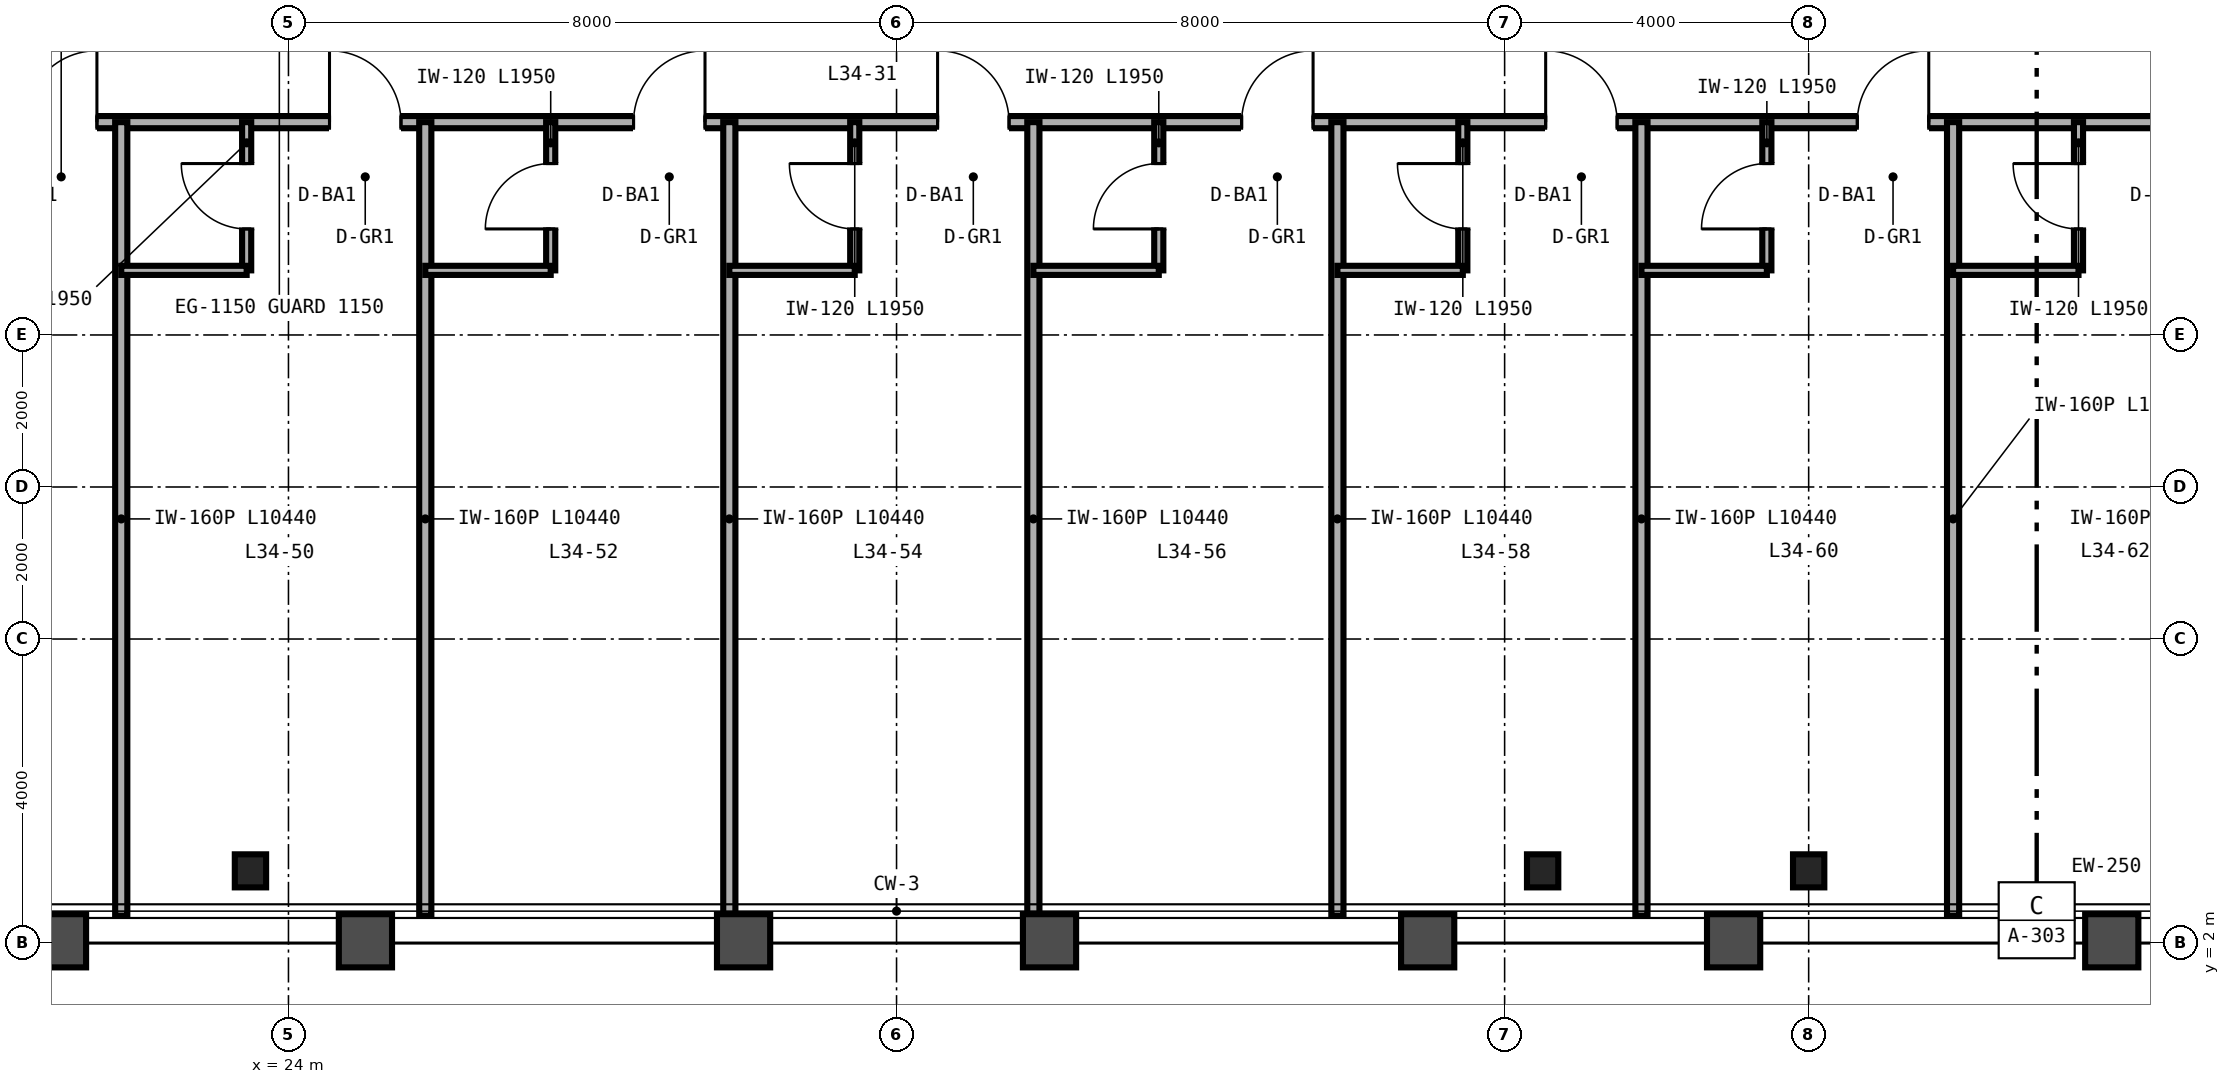
"""IFC4 building model, lengths in metres.
Left out: names, types, materials, properties, quantities, classifications, styles, units other than length and angle.
Written with IfcOpenShell. Run it as: python <this file> out.ifc"""

import sys

from ifc_helpers import new_model, si_unit, direction, frame, frame_2d, origin, origin_2d, place, context, subcontext, project, spatial, rectangle, i_section, extrude, source, transform, mapped, element, fill, save


model = new_model("IFC4")
c1 = context("Model", 3, precision=1e-05, world=origin(), true_north=direction((0.0, 1.0)))
c2 = subcontext(c1, "Body", "Model", "MODEL_VIEW")
j1 = project(units=[si_unit("LENGTHUNIT", "METRE"), si_unit("PLANEANGLEUNIT", "RADIAN")], contexts=[c1])
p1 = place(None, origin())
s1 = spatial("IfcSite", under=j1, at=p1, CompositionType="ELEMENT")
p2 = place(p1, origin())
s2 = spatial("IfcBuilding", under=s1, at=p2, CompositionType="ELEMENT")
p3 = place(p2, frame((0.0, 0.0, 136.8)))
s3 = spatial("IfcBuildingStorey", under=s2, at=p3, CompositionType="ELEMENT", Elevation=136.8)
m1 = source(origin(), c2, "Body", "SweptSolid", [
    extrude(i_section(OverallWidth=0.412, OverallDepth=0.435, WebThickness=0.036, FlangeThickness=0.057, FilletRadius=0.025, at=origin_2d()), origin(), (0.0, 0.0, 1.0), 3.36),
])
for number, where, z_axis, x_axis in (
    (1, (23.5, 2.95, 0.0), (0.0, 0.0, 1.0), (1.0, 0.0, 0.0)),
    (2, (40.5, 2.95, 0.0), (0.0, 0.0, 1.0), (1.0, 0.0, 0.0)),
    (3, (44.0, 2.95, 0.0), (0.0, 0.0, 1.0), (1.0, 0.0, 0.0)),
):
    element("IfcColumn", number, at=place(p3, frame(where, z_axis=z_axis, x_axis=x_axis)), inside=s3, PredefinedType="COLUMN", context=c2, shape_type="MappedRepresentation", body=[
        mapped(m1, transform((0.0, 0.0, 0.0), scale=1.0)),
    ])
p4 = place(p3, frame((14.0, 12.8, 0.0), z_axis=(0.0, 0.0, 1.0), x_axis=(1.0, 0.0, 0.0)))
e4 = element("IfcWall", 4, at=p4, inside=s3, PredefinedType="PARTITIONING", context=c2, shape_type="SweptSolid", body=[
    extrude(rectangle(XDim=36.0, YDim=0.16, at=frame_2d((18.0, 0.0))), origin(), (0.0, 0.0, 1.0), 2.581),
])
p5 = place(p4, frame((2.64, 0.0, 0.0)))
e5 = element("IfcOpeningElement", 5, at=p5, cuts=e4, PredefinedType="OPENING", context=c2, shape_type="SweptSolid", body=[
    extrude(rectangle(XDim=0.94, YDim=2.15, at=frame_2d((0.47, 1.075))), frame((0.0, 0.09, 0.0), z_axis=(0.0, -1.0, 0.0), x_axis=(1.0, 0.0, 0.0)), (0.0, 0.0, 1.0), 0.18),
])
p6 = place(p4, frame((6.54, 0.0, 0.0)))
e6 = element("IfcOpeningElement", 6, at=p6, cuts=e4, PredefinedType="OPENING", context=c2, shape_type="SweptSolid", body=[
    extrude(rectangle(XDim=0.94, YDim=2.15, at=frame_2d((0.47, 1.075))), frame((0.0, 0.09, 0.0), z_axis=(0.0, -1.0, 0.0), x_axis=(1.0, 0.0, 0.0)), (0.0, 0.0, 1.0), 0.18),
])
p7 = place(p4, frame((10.54, 0.0, 0.0)))
e7 = element("IfcOpeningElement", 7, at=p7, cuts=e4, PredefinedType="OPENING", context=c2, shape_type="SweptSolid", body=[
    extrude(rectangle(XDim=0.94, YDim=2.15, at=frame_2d((0.47, 1.075))), frame((0.0, 0.09, 0.0), z_axis=(0.0, -1.0, 0.0), x_axis=(1.0, 0.0, 0.0)), (0.0, 0.0, 1.0), 0.18),
])
p8 = place(p4, frame((14.54, 0.0, 0.0)))
e8 = element("IfcOpeningElement", 8, at=p8, cuts=e4, PredefinedType="OPENING", context=c2, shape_type="SweptSolid", body=[
    extrude(rectangle(XDim=0.94, YDim=2.15, at=frame_2d((0.47, 1.075))), frame((0.0, 0.09, 0.0), z_axis=(0.0, -1.0, 0.0), x_axis=(1.0, 0.0, 0.0)), (0.0, 0.0, 1.0), 0.18),
])
p9 = place(p4, frame((18.54, 0.0, 0.0)))
e9 = element("IfcOpeningElement", 9, at=p9, cuts=e4, PredefinedType="OPENING", context=c2, shape_type="SweptSolid", body=[
    extrude(rectangle(XDim=0.94, YDim=2.15, at=frame_2d((0.47, 1.075))), frame((0.0, 0.09, 0.0), z_axis=(0.0, -1.0, 0.0), x_axis=(1.0, 0.0, 0.0)), (0.0, 0.0, 1.0), 0.18),
])
p10 = place(p4, frame((22.54, 0.0, 0.0)))
e10 = element("IfcOpeningElement", 10, at=p10, cuts=e4, PredefinedType="OPENING", context=c2, shape_type="SweptSolid", body=[
    extrude(rectangle(XDim=0.94, YDim=2.15, at=frame_2d((0.47, 1.075))), frame((0.0, 0.09, 0.0), z_axis=(0.0, -1.0, 0.0), x_axis=(1.0, 0.0, 0.0)), (0.0, 0.0, 1.0), 0.18),
])
p11 = place(p4, frame((26.54, 0.0, 0.0)))
e11 = element("IfcOpeningElement", 11, at=p11, cuts=e4, PredefinedType="OPENING", context=c2, shape_type="SweptSolid", body=[
    extrude(rectangle(XDim=0.94, YDim=2.15, at=frame_2d((0.47, 1.075))), frame((0.0, 0.09, 0.0), z_axis=(0.0, -1.0, 0.0), x_axis=(1.0, 0.0, 0.0)), (0.0, 0.0, 1.0), 0.18),
])
p12 = place(p4, frame((30.64, 0.0, 0.0)))
e12 = element("IfcOpeningElement", 12, at=p12, cuts=e4, PredefinedType="OPENING", context=c2, shape_type="SweptSolid", body=[
    extrude(rectangle(XDim=0.94, YDim=2.15, at=frame_2d((0.47, 1.075))), frame((0.0, 0.09, 0.0), z_axis=(0.0, -1.0, 0.0), x_axis=(1.0, 0.0, 0.0)), (0.0, 0.0, 1.0), 0.18),
])
p13 = place(p4, frame((34.74, 0.0, 0.0)))
e13 = element("IfcOpeningElement", 13, at=p13, cuts=e4, PredefinedType="OPENING", context=c2, shape_type="SweptSolid", body=[
    extrude(rectangle(XDim=0.94, YDim=2.15, at=frame_2d((0.47, 1.075))), frame((0.0, 0.09, 0.0), z_axis=(0.0, -1.0, 0.0), x_axis=(1.0, 0.0, 0.0)), (0.0, 0.0, 1.0), 0.18),
])
p14 = place(p3, frame((21.8, 2.36, 0.0), z_axis=(0.0, 0.0, 1.0), x_axis=(0.0, 1.0, 0.0)))
e14 = element("IfcWall", 14, at=p14, inside=s3, PredefinedType="PARTITIONING", context=c2, shape_type="SweptSolid", body=[
    extrude(rectangle(XDim=10.44, YDim=0.16, at=frame_2d((5.22, 0.0))), origin(), (0.0, 0.0, 1.0), 2.823),
])
p15 = place(p3, frame((25.8, 2.36, 0.0), z_axis=(0.0, 0.0, 1.0), x_axis=(0.0, 1.0, 0.0)))
e15 = element("IfcWall", 15, at=p15, inside=s3, PredefinedType="PARTITIONING", context=c2, shape_type="SweptSolid", body=[
    extrude(rectangle(XDim=10.44, YDim=0.16, at=frame_2d((5.22, 0.0))), origin(), (0.0, 0.0, 1.0), 2.433),
])
p16 = place(p3, frame((23.45, 10.85, 0.0), z_axis=(0.0, 0.0, 1.0), x_axis=(0.0, 1.0, 0.0)))
e16 = element("IfcWall", 16, at=p16, inside=s3, PredefinedType="PARTITIONING", context=c2, shape_type="SweptSolid", body=[
    extrude(rectangle(XDim=1.95, YDim=0.12, at=frame_2d((0.975, 0.0))), origin(), (0.0, 0.0, 1.0), 2.581),
])
p17 = place(p16, frame((0.545, 0.0, 0.0)))
e17 = element("IfcOpeningElement", 17, at=p17, cuts=e16, PredefinedType="OPENING", context=c2, shape_type="SweptSolid", body=[
    extrude(rectangle(XDim=0.86, YDim=2.1, at=frame_2d((0.43, 1.05))), frame((0.0, 0.07, 0.0), z_axis=(0.0, -1.0, 0.0), x_axis=(1.0, 0.0, 0.0)), (0.0, 0.0, 1.0), 0.14),
])
p18 = place(p3, frame((21.8, 10.85, 0.0), z_axis=(0.0, 0.0, 1.0), x_axis=(1.0, 0.0, 0.0)))
e18 = element("IfcWall", 18, at=p18, inside=s3, PredefinedType="PARTITIONING", context=c2, shape_type="SweptSolid", body=[
    extrude(rectangle(XDim=1.65, YDim=0.12, at=frame_2d((0.825, 0.0))), origin(), (0.0, 0.0, 1.0), 2.581),
])
p19 = place(p3, frame((29.8, 2.36, 0.0), z_axis=(0.0, 0.0, 1.0), x_axis=(0.0, 1.0, 0.0)))
e19 = element("IfcWall", 19, at=p19, inside=s3, PredefinedType="PARTITIONING", context=c2, shape_type="SweptSolid", body=[
    extrude(rectangle(XDim=10.44, YDim=0.16, at=frame_2d((5.22, 0.0))), origin(), (0.0, 0.0, 1.0), 2.433),
])
p20 = place(p3, frame((27.45, 10.85, 0.0), z_axis=(0.0, 0.0, 1.0), x_axis=(0.0, 1.0, 0.0)))
e20 = element("IfcWall", 20, at=p20, inside=s3, PredefinedType="PARTITIONING", context=c2, shape_type="SweptSolid", body=[
    extrude(rectangle(XDim=1.95, YDim=0.12, at=frame_2d((0.975, 0.0))), origin(), (0.0, 0.0, 1.0), 3.36),
])
p21 = place(p20, frame((0.545, 0.0, 0.0)))
e21 = element("IfcOpeningElement", 21, at=p21, cuts=e20, PredefinedType="OPENING", context=c2, shape_type="SweptSolid", body=[
    extrude(rectangle(XDim=0.86, YDim=2.1, at=frame_2d((0.43, 1.05))), frame((0.0, 0.07, 0.0), z_axis=(0.0, -1.0, 0.0), x_axis=(1.0, 0.0, 0.0)), (0.0, 0.0, 1.0), 0.14),
])
p22 = place(p3, frame((25.8, 10.85, 0.0), z_axis=(0.0, 0.0, 1.0), x_axis=(1.0, 0.0, 0.0)))
e22 = element("IfcWall", 22, at=p22, inside=s3, PredefinedType="PARTITIONING", context=c2, shape_type="SweptSolid", body=[
    extrude(rectangle(XDim=1.65, YDim=0.12, at=frame_2d((0.825, 0.0))), origin(), (0.0, 0.0, 1.0), 3.36),
])
p23 = place(p3, frame((33.8, 2.36, 0.0), z_axis=(0.0, 0.0, 1.0), x_axis=(0.0, 1.0, 0.0)))
e23 = element("IfcWall", 23, at=p23, inside=s3, PredefinedType="PARTITIONING", context=c2, shape_type="SweptSolid", body=[
    extrude(rectangle(XDim=10.44, YDim=0.16, at=frame_2d((5.22, 0.0))), origin(), (0.0, 0.0, 1.0), 2.433),
])
p24 = place(p3, frame((31.45, 10.85, 0.0), z_axis=(0.0, 0.0, 1.0), x_axis=(0.0, 1.0, 0.0)))
e24 = element("IfcWall", 24, at=p24, inside=s3, PredefinedType="PARTITIONING", context=c2, shape_type="SweptSolid", body=[
    extrude(rectangle(XDim=1.95, YDim=0.12, at=frame_2d((0.975, 0.0))), origin(), (0.0, 0.0, 1.0), 3.36),
])
p25 = place(p24, frame((0.545, 0.0, 0.0)))
e25 = element("IfcOpeningElement", 25, at=p25, cuts=e24, PredefinedType="OPENING", context=c2, shape_type="SweptSolid", body=[
    extrude(rectangle(XDim=0.86, YDim=2.1, at=frame_2d((0.43, 1.05))), frame((0.0, 0.07, 0.0), z_axis=(0.0, -1.0, 0.0), x_axis=(1.0, 0.0, 0.0)), (0.0, 0.0, 1.0), 0.14),
])
p26 = place(p3, frame((29.8, 10.85, 0.0), z_axis=(0.0, 0.0, 1.0), x_axis=(1.0, 0.0, 0.0)))
e26 = element("IfcWall", 26, at=p26, inside=s3, PredefinedType="PARTITIONING", context=c2, shape_type="SweptSolid", body=[
    extrude(rectangle(XDim=1.65, YDim=0.12, at=frame_2d((0.825, 0.0))), origin(), (0.0, 0.0, 1.0), 3.36),
])
p27 = place(p3, frame((37.8, 2.36, 0.0), z_axis=(0.0, 0.0, 1.0), x_axis=(0.0, 1.0, 0.0)))
e27 = element("IfcWall", 27, at=p27, inside=s3, PredefinedType="PARTITIONING", context=c2, shape_type="SweptSolid", body=[
    extrude(rectangle(XDim=10.44, YDim=0.16, at=frame_2d((5.22, 0.0))), origin(), (0.0, 0.0, 1.0), 2.433),
])
p28 = place(p3, frame((35.45, 10.85, 0.0), z_axis=(0.0, 0.0, 1.0), x_axis=(0.0, 1.0, 0.0)))
e28 = element("IfcWall", 28, at=p28, inside=s3, PredefinedType="PARTITIONING", context=c2, shape_type="SweptSolid", body=[
    extrude(rectangle(XDim=1.95, YDim=0.12, at=frame_2d((0.975, 0.0))), origin(), (0.0, 0.0, 1.0), 3.36),
])
p29 = place(p28, frame((0.545, 0.0, 0.0)))
e29 = element("IfcOpeningElement", 29, at=p29, cuts=e28, PredefinedType="OPENING", context=c2, shape_type="SweptSolid", body=[
    extrude(rectangle(XDim=0.86, YDim=2.1, at=frame_2d((0.43, 1.05))), frame((0.0, 0.07, 0.0), z_axis=(0.0, -1.0, 0.0), x_axis=(1.0, 0.0, 0.0)), (0.0, 0.0, 1.0), 0.14),
])
p30 = place(p3, frame((33.8, 10.85, 0.0), z_axis=(0.0, 0.0, 1.0), x_axis=(1.0, 0.0, 0.0)))
e30 = element("IfcWall", 30, at=p30, inside=s3, PredefinedType="PARTITIONING", context=c2, shape_type="SweptSolid", body=[
    extrude(rectangle(XDim=1.65, YDim=0.12, at=frame_2d((0.825, 0.0))), origin(), (0.0, 0.0, 1.0), 3.36),
])
p31 = place(p3, frame((41.8, 2.36, 0.0), z_axis=(0.0, 0.0, 1.0), x_axis=(0.0, 1.0, 0.0)))
e31 = element("IfcWall", 31, at=p31, inside=s3, PredefinedType="PARTITIONING", context=c2, shape_type="SweptSolid", body=[
    extrude(rectangle(XDim=10.44, YDim=0.16, at=frame_2d((5.22, 0.0))), origin(), (0.0, 0.0, 1.0), 2.823),
])
p32 = place(p3, frame((39.45, 10.85, 0.0), z_axis=(0.0, 0.0, 1.0), x_axis=(0.0, 1.0, 0.0)))
e32 = element("IfcWall", 32, at=p32, inside=s3, PredefinedType="PARTITIONING", context=c2, shape_type="SweptSolid", body=[
    extrude(rectangle(XDim=1.95, YDim=0.12, at=frame_2d((0.975, 0.0))), origin(), (0.0, 0.0, 1.0), 3.36),
])
p33 = place(p32, frame((0.545, 0.0, 0.0)))
e33 = element("IfcOpeningElement", 33, at=p33, cuts=e32, PredefinedType="OPENING", context=c2, shape_type="SweptSolid", body=[
    extrude(rectangle(XDim=0.86, YDim=2.1, at=frame_2d((0.43, 1.05))), frame((0.0, 0.07, 0.0), z_axis=(0.0, -1.0, 0.0), x_axis=(1.0, 0.0, 0.0)), (0.0, 0.0, 1.0), 0.14),
])
p34 = place(p3, frame((37.8, 10.85, 0.0), z_axis=(0.0, 0.0, 1.0), x_axis=(1.0, 0.0, 0.0)))
e34 = element("IfcWall", 34, at=p34, inside=s3, PredefinedType="PARTITIONING", context=c2, shape_type="SweptSolid", body=[
    extrude(rectangle(XDim=1.65, YDim=0.12, at=frame_2d((0.825, 0.0))), origin(), (0.0, 0.0, 1.0), 3.36),
])
p35 = place(p3, frame((45.9, 2.36, 0.0), z_axis=(0.0, 0.0, 1.0), x_axis=(0.0, 1.0, 0.0)))
e35 = element("IfcWall", 35, at=p35, inside=s3, PredefinedType="PARTITIONING", context=c2, shape_type="SweptSolid", body=[
    extrude(rectangle(XDim=10.44, YDim=0.16, at=frame_2d((5.22, 0.0))), origin(), (0.0, 0.0, 1.0), 2.667),
])
p36 = place(p3, frame((43.45, 10.85, 0.0), z_axis=(0.0, 0.0, 1.0), x_axis=(0.0, 1.0, 0.0)))
e36 = element("IfcWall", 36, at=p36, inside=s3, PredefinedType="PARTITIONING", context=c2, shape_type="SweptSolid", body=[
    extrude(rectangle(XDim=1.95, YDim=0.12, at=frame_2d((0.975, 0.0))), origin(), (0.0, 0.0, 1.0), 3.36),
])
p37 = place(p36, frame((0.545, 0.0, 0.0)))
e37 = element("IfcOpeningElement", 37, at=p37, cuts=e36, PredefinedType="OPENING", context=c2, shape_type="SweptSolid", body=[
    extrude(rectangle(XDim=0.86, YDim=2.1, at=frame_2d((0.43, 1.05))), frame((0.0, 0.07, 0.0), z_axis=(0.0, -1.0, 0.0), x_axis=(1.0, 0.0, 0.0)), (0.0, 0.0, 1.0), 0.14),
])
p38 = place(p3, frame((41.8, 10.85, 0.0), z_axis=(0.0, 0.0, 1.0), x_axis=(1.0, 0.0, 0.0)))
e38 = element("IfcWall", 38, at=p38, inside=s3, PredefinedType="PARTITIONING", context=c2, shape_type="SweptSolid", body=[
    extrude(rectangle(XDim=1.65, YDim=0.12, at=frame_2d((0.825, 0.0))), origin(), (0.0, 0.0, 1.0), 3.36),
])
p39 = place(p3, frame((47.55, 10.85, 0.0), z_axis=(0.0, 0.0, 1.0), x_axis=(0.0, 1.0, 0.0)))
e39 = element("IfcWall", 39, at=p39, inside=s3, PredefinedType="PARTITIONING", context=c2, shape_type="SweptSolid", body=[
    extrude(rectangle(XDim=1.95, YDim=0.12, at=frame_2d((0.975, 0.0))), origin(), (0.0, 0.0, 1.0), 3.36),
])
p40 = place(p39, frame((0.545, 0.0, 0.0)))
e40 = element("IfcOpeningElement", 40, at=p40, cuts=e39, PredefinedType="OPENING", context=c2, shape_type="SweptSolid", body=[
    extrude(rectangle(XDim=0.86, YDim=2.1, at=frame_2d((0.43, 1.05))), frame((0.0, 0.07, 0.0), z_axis=(0.0, -1.0, 0.0), x_axis=(1.0, 0.0, 0.0)), (0.0, 0.0, 1.0), 0.14),
])
p41 = place(p3, frame((45.9, 10.85, 0.0), z_axis=(0.0, 0.0, 1.0), x_axis=(1.0, 0.0, 0.0)))
e41 = element("IfcWall", 41, at=p41, inside=s3, PredefinedType="PARTITIONING", context=c2, shape_type="SweptSolid", body=[
    extrude(rectangle(XDim=1.65, YDim=0.12, at=frame_2d((0.825, 0.0))), origin(), (0.0, 0.0, 1.0), 3.36),
])
m2 = source(origin(), c2, "Body", "SweptSolid", [
    extrude(rectangle(XDim=0.86, YDim=2.1, at=frame_2d((0.43, 1.05))), frame((0.0, 0.025, 0.0), z_axis=(0.0, -1.0, 0.0), x_axis=(1.0, 0.0, 0.0)), (0.0, 0.0, 1.0), 0.05),
])
p42 = place(p17, origin())
e42 = element("IfcDoor", 42, at=p42, inside=s3, OperationType="SINGLE_SWING_RIGHT", PredefinedType="DOOR", context=c2, shape_type="MappedRepresentation", body=[
    mapped(m2, transform((0.0, 0.0, 0.0), scale=1.0)),
])
fill(e17, e42)
p43 = place(p21, origin())
e43 = element("IfcDoor", 43, at=p43, inside=s3, OperationType="SINGLE_SWING_LEFT", PredefinedType="DOOR", context=c2, shape_type="MappedRepresentation", body=[
    mapped(m2, transform((0.0, 0.0, 0.0), scale=1.0)),
])
fill(e21, e43)
p44 = place(p25, origin())
e44 = element("IfcDoor", 44, at=p44, inside=s3, OperationType="SINGLE_SWING_RIGHT", PredefinedType="DOOR", context=c2, shape_type="MappedRepresentation", body=[
    mapped(m2, transform((0.0, 0.0, 0.0), scale=1.0)),
])
fill(e25, e44)
p45 = place(p29, origin())
e45 = element("IfcDoor", 45, at=p45, inside=s3, OperationType="SINGLE_SWING_LEFT", PredefinedType="DOOR", context=c2, shape_type="MappedRepresentation", body=[
    mapped(m2, transform((0.0, 0.0, 0.0), scale=1.0)),
])
fill(e29, e45)
p46 = place(p33, origin())
e46 = element("IfcDoor", 46, at=p46, inside=s3, OperationType="SINGLE_SWING_RIGHT", PredefinedType="DOOR", context=c2, shape_type="MappedRepresentation", body=[
    mapped(m2, transform((0.0, 0.0, 0.0), scale=1.0)),
])
fill(e33, e46)
p47 = place(p37, origin())
e47 = element("IfcDoor", 47, at=p47, inside=s3, OperationType="SINGLE_SWING_LEFT", PredefinedType="DOOR", context=c2, shape_type="MappedRepresentation", body=[
    mapped(m2, transform((0.0, 0.0, 0.0), scale=1.0)),
])
fill(e37, e47)
p48 = place(p40, origin())
e48 = element("IfcDoor", 48, at=p48, inside=s3, OperationType="SINGLE_SWING_RIGHT", PredefinedType="DOOR", context=c2, shape_type="MappedRepresentation", body=[
    mapped(m2, transform((0.0, 0.0, 0.0), scale=1.0)),
])
fill(e40, e48)
m3 = source(origin(), c2, "Body", "SweptSolid", [
    extrude(rectangle(XDim=0.94, YDim=2.15, at=frame_2d((0.47, 1.075))), frame((0.0, 0.025, 0.0), z_axis=(0.0, -1.0, 0.0), x_axis=(1.0, 0.0, 0.0)), (0.0, 0.0, 1.0), 0.05),
])
p49 = place(p6, origin())
e49 = element("IfcDoor", 49, at=p49, inside=s3, OperationType="SINGLE_SWING_RIGHT", PredefinedType="DOOR", context=c2, shape_type="MappedRepresentation", body=[
    mapped(m3, transform((0.0, 0.0, 0.0), scale=1.0)),
])
fill(e6, e49)
p50 = place(p7, origin())
e50 = element("IfcDoor", 50, at=p50, inside=s3, OperationType="SINGLE_SWING_LEFT", PredefinedType="DOOR", context=c2, shape_type="MappedRepresentation", body=[
    mapped(m3, transform((0.0, 0.0, 0.0), scale=1.0)),
])
fill(e7, e50)
p51 = place(p8, origin())
e51 = element("IfcDoor", 51, at=p51, inside=s3, OperationType="SINGLE_SWING_RIGHT", PredefinedType="DOOR", context=c2, shape_type="MappedRepresentation", body=[
    mapped(m3, transform((0.0, 0.0, 0.0), scale=1.0)),
])
fill(e8, e51)
p52 = place(p9, origin())
e52 = element("IfcDoor", 52, at=p52, inside=s3, OperationType="SINGLE_SWING_LEFT", PredefinedType="DOOR", context=c2, shape_type="MappedRepresentation", body=[
    mapped(m3, transform((0.0, 0.0, 0.0), scale=1.0)),
])
fill(e9, e52)
p53 = place(p10, origin())
e53 = element("IfcDoor", 53, at=p53, inside=s3, OperationType="SINGLE_SWING_RIGHT", PredefinedType="DOOR", context=c2, shape_type="MappedRepresentation", body=[
    mapped(m3, transform((0.0, 0.0, 0.0), scale=1.0)),
])
fill(e10, e53)
p54 = place(p11, origin())
e54 = element("IfcDoor", 54, at=p54, inside=s3, OperationType="SINGLE_SWING_LEFT", PredefinedType="DOOR", context=c2, shape_type="MappedRepresentation", body=[
    mapped(m3, transform((0.0, 0.0, 0.0), scale=1.0)),
])
fill(e11, e54)
p55 = place(p12, origin())
e55 = element("IfcDoor", 55, at=p55, inside=s3, OperationType="SINGLE_SWING_RIGHT", PredefinedType="DOOR", context=c2, shape_type="MappedRepresentation", body=[
    mapped(m3, transform((0.0, 0.0, 0.0), scale=1.0)),
])
fill(e12, e55)
save(model, sys.argv[1])
